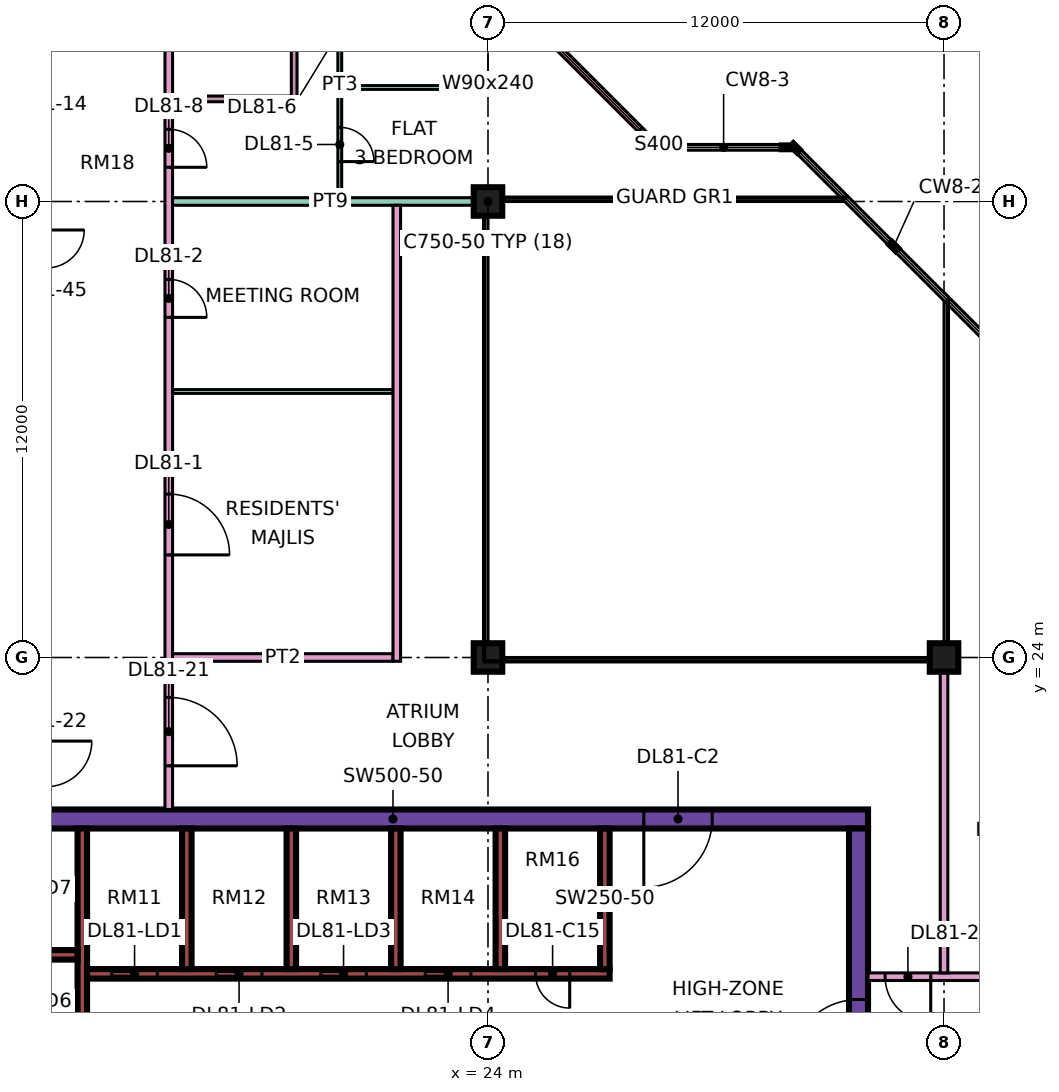
"""IFC4 building model, lengths in metres.
Left out: names, types, materials, properties, quantities, classifications, styles, units other than length and angle.
Written with IfcOpenShell. Run it as: python <this file> out.ifc"""

import sys

from ifc_helpers import new_model, si_unit, direction, frame, frame_2d, origin, origin_2d, place, context, subcontext, project, spatial, rectangle, extrude, element, fill, save


model = new_model("IFC4")
c1 = context("Model", 3, precision=1e-05, world=origin(), true_north=direction((0.0, 1.0)))
c2 = subcontext(c1, "Body", "Model", "MODEL_VIEW")
j1 = project(units=[si_unit("LENGTHUNIT", "METRE"), si_unit("PLANEANGLEUNIT", "RADIAN")], contexts=[c1])
p1 = place(None, origin())
s1 = spatial("IfcSite", under=j1, at=p1, CompositionType="ELEMENT")
p2 = place(p1, origin())
s2 = spatial("IfcBuilding", under=s1, at=p2, CompositionType="ELEMENT")
p3 = place(p2, frame((0.0, 0.0, 350.15)))
s3 = spatial("IfcBuildingStorey", under=s2, at=p3, CompositionType="ELEMENT", Elevation=350.15)
for number, where, z_axis, x_axis in (
    (1, (24.0, 24.0, 0.0), (0.0, 0.0, 1.0), (1.0, 0.0, 0.0)),
    (2, (24.0, 36.0, 0.0), (0.0, 0.0, 1.0), (1.0, 0.0, 0.0)),
    (3, (36.0, 24.0, 0.0), (0.0, 0.0, 1.0), (1.0, 0.0, 0.0)),
):
    element("IfcColumn", number, at=place(p3, frame(where, z_axis=z_axis, x_axis=x_axis)), inside=s3, PredefinedType="COLUMN", context=c2, shape_type="SweptSolid", body=[
        extrude(rectangle(XDim=0.75, YDim=0.75, at=origin_2d()), origin(), (0.0, 0.0, 1.0), 3.75),
    ])
p4 = place(p3, frame((9.0, 19.75, 0.0), z_axis=(0.0, 0.0, 1.0), x_axis=(1.0, 0.0, 0.0)))
e4 = element("IfcWall", 4, at=p4, inside=s3, PredefinedType="SHEAR", context=c2, shape_type="SweptSolid", body=[
    extrude(rectangle(XDim=25.0, YDim=0.5, at=frame_2d((12.5, 0.0))), origin(), (0.0, 0.0, 1.0), 3.75),
])
p5 = place(p4, frame((19.1, 0.0, 0.0)))
e5 = element("IfcOpeningElement", 5, at=p5, cuts=e4, PredefinedType="OPENING", context=c2, shape_type="SweptSolid", body=[
    extrude(rectangle(XDim=1.8, YDim=2.4, at=frame_2d((0.9, 1.2))), frame((0.0, 0.26, 0.0), z_axis=(0.0, -1.0, 0.0), x_axis=(1.0, 0.0, 0.0)), (0.0, 0.0, 1.0), 0.52),
])
p6 = place(p3, frame((33.75, 7.5, 0.0), z_axis=(0.0, 0.0, 1.0), x_axis=(0.0, 1.0, 0.0)))
e6 = element("IfcWall", 6, at=p6, inside=s3, PredefinedType="SHEAR", context=c2, shape_type="SweptSolid", body=[
    extrude(rectangle(XDim=12.0, YDim=0.5, at=frame_2d((6.0, 0.0))), origin(), (0.0, 0.0, 1.0), 3.75),
])
p7 = place(p6, frame((5.7, 0.0, 0.0)))
e7 = element("IfcOpeningElement", 7, at=p7, cuts=e6, PredefinedType="OPENING", context=c2, shape_type="SweptSolid", body=[
    extrude(rectangle(XDim=1.8, YDim=2.4, at=frame_2d((0.9, 1.2))), frame((0.0, 0.26, 0.0), z_axis=(0.0, -1.0, 0.0), x_axis=(1.0, 0.0, 0.0)), (0.0, 0.0, 1.0), 0.52),
])
p8 = place(p3, frame((13.325, 7.5, 0.0), z_axis=(0.0, 0.0, 1.0), x_axis=(0.0, 1.0, 0.0)))
e8 = element("IfcWall", 8, at=p8, inside=s3, PredefinedType="SHEAR", context=c2, shape_type="SweptSolid", body=[
    extrude(rectangle(XDim=12.0, YDim=0.25, at=frame_2d((6.0, 0.0))), origin(), (0.0, 0.0, 1.0), 3.75),
])
p9 = place(p3, frame((13.45, 15.675, 0.0), z_axis=(0.0, 0.0, 1.0), x_axis=(1.0, 0.0, 0.0)))
e9 = element("IfcWall", 9, at=p9, inside=s3, PredefinedType="SHEAR", context=c2, shape_type="SweptSolid", body=[
    extrude(rectangle(XDim=13.75, YDim=0.25, at=frame_2d((6.875, 0.0))), origin(), (0.0, 0.0, 1.0), 3.75),
])
p10 = place(p9, frame((0.65, 0.0, 0.0)))
e10 = element("IfcOpeningElement", 10, at=p10, cuts=e9, PredefinedType="OPENING", context=c2, shape_type="SweptSolid", body=[
    extrude(rectangle(XDim=1.2, YDim=2.2, at=frame_2d((0.6, 1.1))), frame((0.0, 0.135, 0.0), z_axis=(0.0, -1.0, 0.0), x_axis=(1.0, 0.0, 0.0)), (0.0, 0.0, 1.0), 0.27),
])
p11 = place(p9, frame((3.4, 0.0, 0.0)))
e11 = element("IfcOpeningElement", 11, at=p11, cuts=e9, PredefinedType="OPENING", context=c2, shape_type="SweptSolid", body=[
    extrude(rectangle(XDim=1.2, YDim=2.2, at=frame_2d((0.6, 1.1))), frame((0.0, 0.135, 0.0), z_axis=(0.0, -1.0, 0.0), x_axis=(1.0, 0.0, 0.0)), (0.0, 0.0, 1.0), 0.27),
])
p12 = place(p9, frame((6.15, 0.0, 0.0)))
e12 = element("IfcOpeningElement", 12, at=p12, cuts=e9, PredefinedType="OPENING", context=c2, shape_type="SweptSolid", body=[
    extrude(rectangle(XDim=1.2, YDim=2.2, at=frame_2d((0.6, 1.1))), frame((0.0, 0.135, 0.0), z_axis=(0.0, -1.0, 0.0), x_axis=(1.0, 0.0, 0.0)), (0.0, 0.0, 1.0), 0.27),
])
p13 = place(p9, frame((8.9, 0.0, 0.0)))
e13 = element("IfcOpeningElement", 13, at=p13, cuts=e9, PredefinedType="OPENING", context=c2, shape_type="SweptSolid", body=[
    extrude(rectangle(XDim=1.2, YDim=2.2, at=frame_2d((0.6, 1.1))), frame((0.0, 0.135, 0.0), z_axis=(0.0, -1.0, 0.0), x_axis=(1.0, 0.0, 0.0)), (0.0, 0.0, 1.0), 0.27),
])
p14 = place(p9, frame((11.8, 0.0, 0.0)))
e14 = element("IfcOpeningElement", 14, at=p14, cuts=e9, PredefinedType="OPENING", context=c2, shape_type="SweptSolid", body=[
    extrude(rectangle(XDim=0.9, YDim=2.1, at=frame_2d((0.45, 1.05))), frame((0.0, 0.135, 0.0), z_axis=(0.0, -1.0, 0.0), x_axis=(1.0, 0.0, 0.0)), (0.0, 0.0, 1.0), 0.27),
])
p15 = place(p3, frame((10.2, 16.175, 0.0), z_axis=(0.0, 0.0, 1.0), x_axis=(1.0, 0.0, 0.0)))
e15 = element("IfcWall", 15, at=p15, inside=s3, PredefinedType="SHEAR", context=c2, shape_type="SweptSolid", body=[
    extrude(rectangle(XDim=3.0, YDim=0.25, at=frame_2d((1.5, 0.0))), origin(), (0.0, 0.0, 1.0), 3.75),
])
for number, where, z_axis, x_axis in (
    (16, (16.075, 15.8, 0.0), (0.0, 0.0, 1.0), (0.0, 1.0, 0.0)),
    (17, (18.825, 15.8, 0.0), (0.0, 0.0, 1.0), (0.0, 1.0, 0.0)),
    (18, (21.575, 15.8, 0.0), (0.0, 0.0, 1.0), (0.0, 1.0, 0.0)),
    (19, (24.325, 15.8, 0.0), (0.0, 0.0, 1.0), (0.0, 1.0, 0.0)),
    (20, (27.075, 15.8, 0.0), (0.0, 0.0, 1.0), (0.0, 1.0, 0.0)),
):
    element("IfcWall", number, at=place(p3, frame(where, z_axis=z_axis, x_axis=x_axis)), inside=s3, PredefinedType="SHEAR", context=c2, shape_type="SweptSolid", body=[
        extrude(rectangle(XDim=3.7, YDim=0.25, at=frame_2d((1.85, 0.0))), origin(), (0.0, 0.0, 1.0), 3.75),
    ])
p16 = place(p3, frame((28.447, 37.447, 0.0), z_axis=(0.0, 0.0, 1.0), x_axis=(-0.707106781187, 0.707106781187, 0.0)))
e21 = element("IfcWall", 21, at=p16, inside=s3, PredefinedType="SOLIDWALL", context=c2, shape_type="SweptSolid", body=[
    extrude(rectangle(XDim=4.243, YDim=0.15, at=frame_2d((2.121, 0.0))), origin(), (0.0, 0.0, 1.0), 3.35),
])
p17 = place(p16, frame((0.621, 0.0, 0.45)))
e22 = element("IfcOpeningElement", 22, at=p17, cuts=e21, PredefinedType="OPENING", context=c2, shape_type="SweptSolid", body=[
    extrude(rectangle(XDim=3.0, YDim=2.4, at=frame_2d((1.5, 1.2))), frame((0.0, 0.085, 0.0), z_axis=(0.0, -1.0, 0.0), x_axis=(1.0, 0.0, 0.0)), (0.0, 0.0, 1.0), 0.17),
])
p18 = place(p3, frame((15.6, 20.0, 0.0), z_axis=(0.0, 0.0, 1.0), x_axis=(0.0, 1.0, 0.0)))
e23 = element("IfcWall", 23, at=p18, inside=s3, PredefinedType="PARTITIONING", context=c2, shape_type="SweptSolid", body=[
    extrude(rectangle(XDim=27.775, YDim=0.2, at=frame_2d((13.887, 0.0))), origin(), (0.0, 0.0, 1.0), 3.35),
])
p19 = place(p18, frame((6.7, 0.0, 0.0)))
e24 = element("IfcOpeningElement", 24, at=p19, cuts=e23, PredefinedType="OPENING", context=c2, shape_type="SweptSolid", body=[
    extrude(rectangle(XDim=1.6, YDim=2.1, at=frame_2d((0.8, 1.05))), frame((0.0, 0.11, 0.0), z_axis=(0.0, -1.0, 0.0), x_axis=(1.0, 0.0, 0.0)), (0.0, 0.0, 1.0), 0.22),
])
p20 = place(p18, frame((12.95, 0.0, 0.0)))
e25 = element("IfcOpeningElement", 25, at=p20, cuts=e23, PredefinedType="OPENING", context=c2, shape_type="SweptSolid", body=[
    extrude(rectangle(XDim=1.0, YDim=2.1, at=frame_2d((0.5, 1.05))), frame((0.0, 0.11, 0.0), z_axis=(0.0, -1.0, 0.0), x_axis=(1.0, 0.0, 0.0)), (0.0, 0.0, 1.0), 0.22),
])
p21 = place(p18, frame((16.9, 0.0, 0.0)))
e26 = element("IfcOpeningElement", 26, at=p21, cuts=e23, PredefinedType="OPENING", context=c2, shape_type="SweptSolid", body=[
    extrude(rectangle(XDim=1.0, YDim=2.1, at=frame_2d((0.5, 1.05))), frame((0.0, 0.11, 0.0), z_axis=(0.0, -1.0, 0.0), x_axis=(1.0, 0.0, 0.0)), (0.0, 0.0, 1.0), 0.22),
])
p22 = place(p18, frame((1.15, 0.0, 0.0)))
e27 = element("IfcOpeningElement", 27, at=p22, cuts=e23, PredefinedType="OPENING", context=c2, shape_type="SweptSolid", body=[
    extrude(rectangle(XDim=1.8, YDim=2.1, at=frame_2d((0.9, 1.05))), frame((0.0, 0.11, 0.0), z_axis=(0.0, -1.0, 0.0), x_axis=(1.0, 0.0, 0.0)), (0.0, 0.0, 1.0), 0.22),
])
p23 = place(p18, frame((25.9, 0.0, 0.0)))
e28 = element("IfcOpeningElement", 28, at=p23, cuts=e23, PredefinedType="OPENING", context=c2, shape_type="SweptSolid", body=[
    extrude(rectangle(XDim=1.0, YDim=2.1, at=frame_2d((0.5, 1.05))), frame((0.0, 0.11, 0.0), z_axis=(0.0, -1.0, 0.0), x_axis=(1.0, 0.0, 0.0)), (0.0, 0.0, 1.0), 0.22),
])
p24 = place(p3, frame((15.7, 24.0, 0.0), z_axis=(0.0, 0.0, 1.0), x_axis=(1.0, 0.0, 0.0)))
e29 = element("IfcWall", 29, at=p24, inside=s3, PredefinedType="PARTITIONING", context=c2, shape_type="SweptSolid", body=[
    extrude(rectangle(XDim=5.8, YDim=0.2, at=frame_2d((2.9, 0.0))), origin(), (0.0, 0.0, 1.0), 3.35),
])
p25 = place(p3, frame((15.7, 31.0, 0.0), z_axis=(0.0, 0.0, 1.0), x_axis=(1.0, 0.0, 0.0)))
e30 = element("IfcWall", 30, at=p25, inside=s3, PredefinedType="PARTITIONING", context=c2, shape_type="SweptSolid", body=[
    extrude(rectangle(XDim=5.8, YDim=0.1, at=frame_2d((2.9, 0.0))), origin(), (0.0, 0.0, 1.0), 3.35),
])
p26 = place(p3, frame((15.7, 36.0, 0.0), z_axis=(0.0, 0.0, 1.0), x_axis=(1.0, 0.0, 0.0)))
e31 = element("IfcWall", 31, at=p26, inside=s3, PredefinedType="PARTITIONING", context=c2, shape_type="SweptSolid", body=[
    extrude(rectangle(XDim=8.3, YDim=0.2, at=frame_2d((4.15, 0.0))), origin(), (0.0, 0.0, 1.0), 3.35),
])
p27 = place(p3, frame((15.7, 38.7, 0.0), z_axis=(0.0, 0.0, 1.0), x_axis=(1.0, 0.0, 0.0)))
e32 = element("IfcWall", 32, at=p27, inside=s3, PredefinedType="PARTITIONING", context=c2, shape_type="SweptSolid", body=[
    extrude(rectangle(XDim=3.125, YDim=0.15, at=frame_2d((1.562, 0.0))), origin(), (0.0, 0.0, 1.0), 3.35),
])
p28 = place(p3, frame((18.9, 38.625, 0.0), z_axis=(0.0, 0.0, 1.0), x_axis=(0.0, 1.0, 0.0)))
e33 = element("IfcWall", 33, at=p28, inside=s3, PredefinedType="PARTITIONING", context=c2, shape_type="SweptSolid", body=[
    extrude(rectangle(XDim=6.275, YDim=0.15, at=frame_2d((3.137, 0.0))), origin(), (0.0, 0.0, 1.0), 3.35),
])
p29 = place(p28, frame((1.375, 0.0, 0.0)))
e34 = element("IfcOpeningElement", 34, at=p29, cuts=e33, PredefinedType="OPENING", context=c2, shape_type="SweptSolid", body=[
    extrude(rectangle(XDim=0.8, YDim=2.1, at=frame_2d((0.4, 1.05))), frame((0.0, 0.085, 0.0), z_axis=(0.0, -1.0, 0.0), x_axis=(1.0, 0.0, 0.0)), (0.0, 0.0, 1.0), 0.17),
])
p30 = place(p28, frame((4.425, 0.0, 0.0)))
e35 = element("IfcOpeningElement", 35, at=p30, cuts=e33, PredefinedType="OPENING", context=c2, shape_type="SweptSolid", body=[
    extrude(rectangle(XDim=0.9, YDim=2.1, at=frame_2d((0.45, 1.05))), frame((0.0, 0.085, 0.0), z_axis=(0.0, -1.0, 0.0), x_axis=(1.0, 0.0, 0.0)), (0.0, 0.0, 1.0), 0.17),
])
p31 = place(p3, frame((20.1, 36.1, 0.0), z_axis=(0.0, 0.0, 1.0), x_axis=(0.0, 1.0, 0.0)))
e36 = element("IfcWall", 36, at=p31, inside=s3, PredefinedType="PARTITIONING", context=c2, shape_type="SweptSolid", body=[
    extrude(rectangle(XDim=5.95, YDim=0.1, at=frame_2d((2.975, 0.0))), origin(), (0.0, 0.0, 1.0), 3.35),
])
p32 = place(p31, frame((0.95, 0.0, 0.0)))
e37 = element("IfcOpeningElement", 37, at=p32, cuts=e36, PredefinedType="OPENING", context=c2, shape_type="SweptSolid", body=[
    extrude(rectangle(XDim=0.9, YDim=2.1, at=frame_2d((0.45, 1.05))), frame((0.0, 0.06, 0.0), z_axis=(0.0, -1.0, 0.0), x_axis=(1.0, 0.0, 0.0)), (0.0, 0.0, 1.0), 0.12),
])
p33 = place(p31, frame((3.95, 0.0, 0.0)))
e38 = element("IfcOpeningElement", 38, at=p33, cuts=e36, PredefinedType="OPENING", context=c2, shape_type="SweptSolid", body=[
    extrude(rectangle(XDim=0.9, YDim=2.1, at=frame_2d((0.45, 1.05))), frame((0.0, 0.06, 0.0), z_axis=(0.0, -1.0, 0.0), x_axis=(1.0, 0.0, 0.0)), (0.0, 0.0, 1.0), 0.12),
])
p34 = place(p3, frame((20.15, 39.0, 0.0), z_axis=(0.0, 0.0, 1.0), x_axis=(1.0, 0.0, 0.0)))
e39 = element("IfcWall", 39, at=p34, inside=s3, PredefinedType="PARTITIONING", context=c2, shape_type="SweptSolid", body=[
    extrude(rectangle(XDim=3.85, YDim=0.1, at=frame_2d((1.925, 0.0))), origin(), (0.0, 0.0, 1.0), 3.35),
])
p35 = place(p3, frame((21.6, 23.9, 0.0), z_axis=(0.0, 0.0, 1.0), x_axis=(0.0, 1.0, 0.0)))
e40 = element("IfcWall", 40, at=p35, inside=s3, PredefinedType="PARTITIONING", context=c2, shape_type="SweptSolid", body=[
    extrude(rectangle(XDim=12.0, YDim=0.2, at=frame_2d((6.0, 0.0))), origin(), (0.0, 0.0, 1.0), 3.35),
])
p36 = place(p3, frame((34.0, 15.6, 0.0), z_axis=(0.0, 0.0, 1.0), x_axis=(1.0, 0.0, 0.0)))
e41 = element("IfcWall", 41, at=p36, inside=s3, PredefinedType="PARTITIONING", context=c2, shape_type="SweptSolid", body=[
    extrude(rectangle(XDim=10.35, YDim=0.2, at=frame_2d((5.175, 0.0))), origin(), (0.0, 0.0, 1.0), 3.35),
])
p37 = place(p36, frame((5.6, 0.0, 0.0)))
e42 = element("IfcOpeningElement", 42, at=p37, cuts=e41, PredefinedType="OPENING", context=c2, shape_type="SweptSolid", body=[
    extrude(rectangle(XDim=1.0, YDim=2.1, at=frame_2d((0.5, 1.05))), frame((0.0, 0.11, 0.0), z_axis=(0.0, -1.0, 0.0), x_axis=(1.0, 0.0, 0.0)), (0.0, 0.0, 1.0), 0.22),
])
p38 = place(p36, frame((0.45, 0.0, 0.0)))
e43 = element("IfcOpeningElement", 43, at=p38, cuts=e41, PredefinedType="OPENING", context=c2, shape_type="SweptSolid", body=[
    extrude(rectangle(XDim=1.2, YDim=2.1, at=frame_2d((0.6, 1.05))), frame((0.0, 0.11, 0.0), z_axis=(0.0, -1.0, 0.0), x_axis=(1.0, 0.0, 0.0)), (0.0, 0.0, 1.0), 0.22),
])
p39 = place(p3, frame((36.0, 15.7, 0.0), z_axis=(0.0, 0.0, 1.0), x_axis=(0.0, 1.0, 0.0)))
e44 = element("IfcWall", 44, at=p39, inside=s3, PredefinedType="PARTITIONING", context=c2, shape_type="SweptSolid", body=[
    extrude(rectangle(XDim=8.3, YDim=0.2, at=frame_2d((4.15, 0.0))), origin(), (0.0, 0.0, 1.0), 3.35),
])
p40 = place(p17, origin())
e45 = element("IfcWindow", 45, at=p40, inside=s3, PartitioningType="SINGLE_PANEL", PredefinedType="WINDOW", context=c2, shape_type="SweptSolid", body=[
    extrude(rectangle(XDim=3.0, YDim=2.4, at=frame_2d((1.5, 1.2))), frame((0.0, 0.03, 0.0), z_axis=(0.0, -1.0, 0.0), x_axis=(1.0, 0.0, 0.0)), (0.0, 0.0, 1.0), 0.06),
])
fill(e22, e45)
p41 = place(p10, origin())
e46 = element("IfcDoor", 46, at=p41, inside=s3, OperationType="DOUBLE_DOOR_SLIDING", PredefinedType="DOOR", context=c2, shape_type="SweptSolid", body=[
    extrude(rectangle(XDim=1.2, YDim=2.2, at=frame_2d((0.6, 1.1))), frame((0.0, 0.025, 0.0), z_axis=(0.0, -1.0, 0.0), x_axis=(1.0, 0.0, 0.0)), (0.0, 0.0, 1.0), 0.05),
])
fill(e10, e46)
p42 = place(p11, origin())
e47 = element("IfcDoor", 47, at=p42, inside=s3, OperationType="DOUBLE_DOOR_SLIDING", PredefinedType="DOOR", context=c2, shape_type="SweptSolid", body=[
    extrude(rectangle(XDim=1.2, YDim=2.2, at=frame_2d((0.6, 1.1))), frame((0.0, 0.025, 0.0), z_axis=(0.0, -1.0, 0.0), x_axis=(1.0, 0.0, 0.0)), (0.0, 0.0, 1.0), 0.05),
])
fill(e11, e47)
p43 = place(p12, origin())
e48 = element("IfcDoor", 48, at=p43, inside=s3, OperationType="DOUBLE_DOOR_SLIDING", PredefinedType="DOOR", context=c2, shape_type="SweptSolid", body=[
    extrude(rectangle(XDim=1.2, YDim=2.2, at=frame_2d((0.6, 1.1))), frame((0.0, 0.025, 0.0), z_axis=(0.0, -1.0, 0.0), x_axis=(1.0, 0.0, 0.0)), (0.0, 0.0, 1.0), 0.05),
])
fill(e12, e48)
p44 = place(p13, origin())
e49 = element("IfcDoor", 49, at=p44, inside=s3, OperationType="DOUBLE_DOOR_SLIDING", PredefinedType="DOOR", context=c2, shape_type="SweptSolid", body=[
    extrude(rectangle(XDim=1.2, YDim=2.2, at=frame_2d((0.6, 1.1))), frame((0.0, 0.025, 0.0), z_axis=(0.0, -1.0, 0.0), x_axis=(1.0, 0.0, 0.0)), (0.0, 0.0, 1.0), 0.05),
])
fill(e13, e49)
p45 = place(p7, origin())
e50 = element("IfcDoor", 50, at=p45, inside=s3, OperationType="DOUBLE_DOOR_SINGLE_SWING", PredefinedType="DOOR", context=c2, shape_type="SweptSolid", body=[
    extrude(rectangle(XDim=1.8, YDim=2.4, at=frame_2d((0.9, 1.2))), frame((0.0, 0.025, 0.0), z_axis=(0.0, -1.0, 0.0), x_axis=(1.0, 0.0, 0.0)), (0.0, 0.0, 1.0), 0.05),
])
fill(e7, e50)
p46 = place(p5, frame((1.8, 0.0, 0.0), z_axis=(0.0, 0.0, 1.0), x_axis=(-1.0, 0.0, 0.0)))
e51 = element("IfcDoor", 51, at=p46, inside=s3, OperationType="DOUBLE_DOOR_SINGLE_SWING", PredefinedType="DOOR", context=c2, shape_type="SweptSolid", body=[
    extrude(rectangle(XDim=1.8, YDim=2.4, at=frame_2d((0.9, 1.2))), frame((0.0, 0.025, 0.0), z_axis=(0.0, -1.0, 0.0), x_axis=(1.0, 0.0, 0.0)), (0.0, 0.0, 1.0), 0.05),
])
fill(e5, e51)
p47 = place(p14, origin())
e52 = element("IfcDoor", 52, at=p47, inside=s3, OperationType="SINGLE_SWING_RIGHT", PredefinedType="DOOR", context=c2, shape_type="SweptSolid", body=[
    extrude(rectangle(XDim=0.9, YDim=2.1, at=frame_2d((0.45, 1.05))), frame((0.0, 0.025, 0.0), z_axis=(0.0, -1.0, 0.0), x_axis=(1.0, 0.0, 0.0)), (0.0, 0.0, 1.0), 0.05),
])
fill(e14, e52)
p48 = place(p19, frame((1.6, 0.0, 0.0), z_axis=(0.0, 0.0, 1.0), x_axis=(-1.0, 0.0, 0.0)))
e53 = element("IfcDoor", 53, at=p48, inside=s3, OperationType="DOUBLE_DOOR_SINGLE_SWING", PredefinedType="DOOR", context=c2, shape_type="SweptSolid", body=[
    extrude(rectangle(XDim=1.6, YDim=2.1, at=frame_2d((0.8, 1.05))), frame((0.0, 0.025, 0.0), z_axis=(0.0, -1.0, 0.0), x_axis=(1.0, 0.0, 0.0)), (0.0, 0.0, 1.0), 0.05),
])
fill(e24, e53)
p49 = place(p20, frame((1.0, 0.0, 0.0), z_axis=(0.0, 0.0, 1.0), x_axis=(-1.0, 0.0, 0.0)))
e54 = element("IfcDoor", 54, at=p49, inside=s3, OperationType="SINGLE_SWING_LEFT", PredefinedType="DOOR", context=c2, shape_type="SweptSolid", body=[
    extrude(rectangle(XDim=1.0, YDim=2.1, at=frame_2d((0.5, 1.05))), frame((0.0, 0.025, 0.0), z_axis=(0.0, -1.0, 0.0), x_axis=(1.0, 0.0, 0.0)), (0.0, 0.0, 1.0), 0.05),
])
fill(e25, e54)
p50 = place(p32, frame((0.9, 0.0, 0.0), z_axis=(0.0, 0.0, 1.0), x_axis=(-1.0, 0.0, 0.0)))
e55 = element("IfcDoor", 55, at=p50, inside=s3, OperationType="SINGLE_SWING_LEFT", PredefinedType="DOOR", context=c2, shape_type="SweptSolid", body=[
    extrude(rectangle(XDim=0.9, YDim=2.1, at=frame_2d((0.45, 1.05))), frame((0.0, 0.025, 0.0), z_axis=(0.0, -1.0, 0.0), x_axis=(1.0, 0.0, 0.0)), (0.0, 0.0, 1.0), 0.05),
])
fill(e37, e55)
p51 = place(p21, frame((1.0, 0.0, 0.0), z_axis=(0.0, 0.0, 1.0), x_axis=(-1.0, 0.0, 0.0)))
e56 = element("IfcDoor", 56, at=p51, inside=s3, OperationType="SINGLE_SWING_LEFT", PredefinedType="DOOR", context=c2, shape_type="SweptSolid", body=[
    extrude(rectangle(XDim=1.0, YDim=2.1, at=frame_2d((0.5, 1.05))), frame((0.0, 0.025, 0.0), z_axis=(0.0, -1.0, 0.0), x_axis=(1.0, 0.0, 0.0)), (0.0, 0.0, 1.0), 0.05),
])
fill(e26, e56)
p52 = place(p38, origin())
e57 = element("IfcDoor", 57, at=p52, inside=s3, OperationType="SINGLE_SWING_RIGHT", PredefinedType="DOOR", context=c2, shape_type="SweptSolid", body=[
    extrude(rectangle(XDim=1.2, YDim=2.1, at=frame_2d((0.6, 1.05))), frame((0.0, 0.025, 0.0), z_axis=(0.0, -1.0, 0.0), x_axis=(1.0, 0.0, 0.0)), (0.0, 0.0, 1.0), 0.05),
])
fill(e43, e57)
p53 = place(p22, frame((1.8, 0.0, 0.0), z_axis=(0.0, 0.0, 1.0), x_axis=(-1.0, 0.0, 0.0)))
e58 = element("IfcDoor", 58, at=p53, inside=s3, OperationType="DOUBLE_DOOR_SINGLE_SWING", PredefinedType="DOOR", context=c2, shape_type="SweptSolid", body=[
    extrude(rectangle(XDim=1.8, YDim=2.1, at=frame_2d((0.9, 1.05))), frame((0.0, 0.025, 0.0), z_axis=(0.0, -1.0, 0.0), x_axis=(1.0, 0.0, 0.0)), (0.0, 0.0, 1.0), 0.05),
])
fill(e27, e58)
save(model, sys.argv[1])
